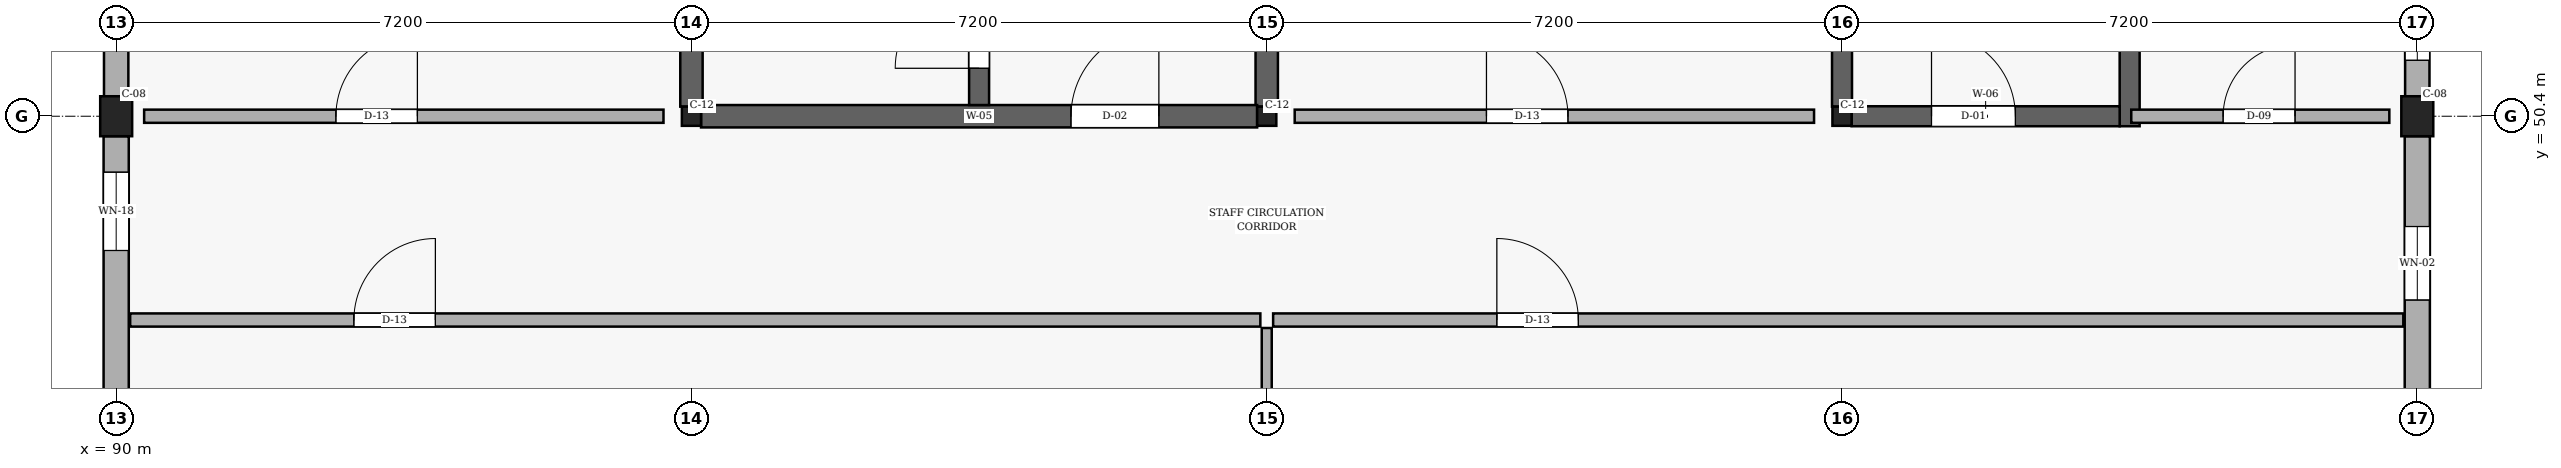
"""IFC4 building model, lengths in metres.
Left out: names, types, materials, properties, quantities, classifications, styles, units other than length and angle.
Written with IfcOpenShell. Run it as: python <this file> out.ifc"""

import sys

from ifc_helpers import new_model, si_unit, direction, frame, frame_2d, origin, origin_2d, place, context, subcontext, project, spatial, rectangle, i_section, extrude, element, fill, save


model = new_model("IFC4")
c1 = context("Model", 3, precision=1e-05, world=origin(), true_north=direction((0.0, 1.0)))
c2 = subcontext(c1, "Body", "Model", "MODEL_VIEW")
j1 = project(units=[si_unit("LENGTHUNIT", "METRE"), si_unit("PLANEANGLEUNIT", "RADIAN")], contexts=[c1])
p1 = place(None, origin())
s1 = spatial("IfcSite", under=j1, at=p1, CompositionType="ELEMENT")
p2 = place(p1, origin())
s2 = spatial("IfcBuilding", under=s1, at=p2, CompositionType="ELEMENT")
p3 = place(p2, frame((0.0, 0.0, 4.5)))
s3 = spatial("IfcBuildingStorey", under=s2, at=p3, CompositionType="ELEMENT", Elevation=4.5)
p4 = place(p3, frame((90.0, 50.4, 0.0), z_axis=(0.0, 0.0, 1.0), x_axis=(1.0, 0.0, 0.0)))
e1 = element("IfcColumn", 1, at=p4, inside=s3, PredefinedType="COLUMN", context=c2, shape_type="SweptSolid", body=[
    extrude(rectangle(XDim=0.4, YDim=0.5, at=origin_2d()), origin(), (0.0, 0.0, 1.0), 3.15),
])
for number, where, z_axis, x_axis in (
    (2, (97.2, 50.4, 0.0), (0.0, 0.0, 1.0), (1.0, 0.0, 0.0)),
    (3, (104.4, 50.4, 0.0), (0.0, 0.0, 1.0), (1.0, 0.0, 0.0)),
    (4, (111.6, 50.4, 0.0), (0.0, 0.0, 1.0), (1.0, 0.0, 0.0)),
):
    element("IfcColumn", number, at=place(p3, frame(where, z_axis=z_axis, x_axis=x_axis)), inside=s3, PredefinedType="COLUMN", context=c2, shape_type="SweptSolid", body=[
        extrude(i_section(OverallWidth=0.24, OverallDepth=0.24, WebThickness=0.01, FlangeThickness=0.017, FilletRadius=0.021, at=origin_2d()), origin(), (0.0, 0.0, 1.0), 3.15),
    ])
p5 = place(p3, frame((118.8, 50.4, 0.0), z_axis=(0.0, 0.0, 1.0), x_axis=(1.0, 0.0, 0.0)))
e5 = element("IfcColumn", 5, at=p5, inside=s3, PredefinedType="COLUMN", context=c2, shape_type="SweptSolid", body=[
    extrude(rectangle(XDim=0.4, YDim=0.5, at=origin_2d()), origin(), (0.0, 0.0, 1.0), 3.15),
])
p6 = place(p3, frame((118.8, 43.45, 0.0), z_axis=(0.0, 0.0, 1.0), x_axis=(0.0, 1.0, 0.0)))
e6 = element("IfcWall", 6, at=p6, inside=s3, PredefinedType="SOLIDWALL", context=c2, shape_type="SweptSolid", body=[
    extrude(rectangle(XDim=6.7, YDim=0.315, at=frame_2d((3.35, 0.0))), origin(), (0.0, 0.0, 1.0), 2.34),
])
p7 = place(p6, frame((0.45, 0.0, 0.78)))
e7 = element("IfcOpeningElement", 7, at=p7, cuts=e6, PredefinedType="OPENING", context=c2, shape_type="SweptSolid", body=[
    extrude(rectangle(XDim=1.45, YDim=1.44, at=frame_2d((0.725, 0.72))), frame((0.0, 0.167, 0.0), z_axis=(0.0, -1.0, 0.0), x_axis=(1.0, 0.0, 0.0)), (0.0, 0.0, 1.0), 0.335),
])
p8 = place(p6, frame((4.65, 0.0, 0.78)))
e8 = element("IfcOpeningElement", 8, at=p8, cuts=e6, PredefinedType="OPENING", context=c2, shape_type="SweptSolid", body=[
    extrude(rectangle(XDim=0.92, YDim=1.15, at=frame_2d((0.46, 0.575))), frame((0.0, 0.167, 0.0), z_axis=(0.0, -1.0, 0.0), x_axis=(1.0, 0.0, 0.0)), (0.0, 0.0, 1.0), 0.335),
])
p9 = place(p3, frame((118.8, 50.65, 0.0), z_axis=(0.0, 0.0, 1.0), x_axis=(0.0, 1.0, 0.0)))
e9 = element("IfcWall", 9, at=p9, inside=s3, PredefinedType="SOLIDWALL", context=c2, shape_type="SweptSolid", body=[
    extrude(rectangle(XDim=6.7, YDim=0.305, at=frame_2d((3.35, 0.0))), origin(), (0.0, 0.0, 1.0), 2.34),
])
p10 = place(p9, frame((0.45, 0.0, 0.78)))
e10 = element("IfcOpeningElement", 10, at=p10, cuts=e9, PredefinedType="OPENING", context=c2, shape_type="SweptSolid", body=[
    extrude(rectangle(XDim=0.92, YDim=1.15, at=frame_2d((0.46, 0.575))), frame((0.0, 0.163, 0.0), z_axis=(0.0, -1.0, 0.0), x_axis=(1.0, 0.0, 0.0)), (0.0, 0.0, 1.0), 0.325),
])
p11 = place(p9, frame((4.65, 0.0, 0.78)))
e11 = element("IfcOpeningElement", 11, at=p11, cuts=e9, PredefinedType="OPENING", context=c2, shape_type="SweptSolid", body=[
    extrude(rectangle(XDim=1.08, YDim=1.15, at=frame_2d((0.54, 0.575))), frame((0.0, 0.163, 0.0), z_axis=(0.0, -1.0, 0.0), x_axis=(1.0, 0.0, 0.0)), (0.0, 0.0, 1.0), 0.325),
])
p12 = place(p3, frame((90.0, 57.35, 0.0), z_axis=(0.0, 0.0, 1.0), x_axis=(0.0, -1.0, 0.0)))
e12 = element("IfcWall", 12, at=p12, inside=s3, PredefinedType="SOLIDWALL", context=c2, shape_type="SweptSolid", body=[
    extrude(rectangle(XDim=6.7, YDim=0.305, at=frame_2d((3.35, 0.0))), origin(), (0.0, 0.0, 1.0), 2.34),
])
p13 = place(p12, frame((0.45, 0.0, 0.78)))
e13 = element("IfcOpeningElement", 13, at=p13, cuts=e12, PredefinedType="OPENING", context=c2, shape_type="SweptSolid", body=[
    extrude(rectangle(XDim=1.44, YDim=1.26, at=frame_2d((0.72, 0.63))), frame((0.0, 0.163, 0.0), z_axis=(0.0, -1.0, 0.0), x_axis=(1.0, 0.0, 0.0)), (0.0, 0.0, 1.0), 0.325),
])
p14 = place(p12, frame((4.65, 0.0, 0.78)))
e14 = element("IfcOpeningElement", 14, at=p14, cuts=e12, PredefinedType="OPENING", context=c2, shape_type="SweptSolid", body=[
    extrude(rectangle(XDim=0.98, YDim=1.36, at=frame_2d((0.49, 0.68))), frame((0.0, 0.163, 0.0), z_axis=(0.0, -1.0, 0.0), x_axis=(1.0, 0.0, 0.0)), (0.0, 0.0, 1.0), 0.325),
])
p15 = place(p3, frame((90.0, 50.15, 0.0), z_axis=(0.0, 0.0, 1.0), x_axis=(0.0, -1.0, 0.0)))
e15 = element("IfcWall", 15, at=p15, inside=s3, PredefinedType="SOLIDWALL", context=c2, shape_type="SweptSolid", body=[
    extrude(rectangle(XDim=6.7, YDim=0.315, at=frame_2d((3.35, 0.0))), origin(), (0.0, 0.0, 1.0), 2.34),
])
p16 = place(p15, frame((0.45, 0.0, 0.78)))
e16 = element("IfcOpeningElement", 16, at=p16, cuts=e15, PredefinedType="OPENING", context=c2, shape_type="SweptSolid", body=[
    extrude(rectangle(XDim=0.98, YDim=1.36, at=frame_2d((0.49, 0.68))), frame((0.0, 0.167, 0.0), z_axis=(0.0, -1.0, 0.0), x_axis=(1.0, 0.0, 0.0)), (0.0, 0.0, 1.0), 0.335),
])
p17 = place(p15, frame((4.65, 0.0, 0.78)))
e17 = element("IfcOpeningElement", 17, at=p17, cuts=e15, PredefinedType="OPENING", context=c2, shape_type="SweptSolid", body=[
    extrude(rectangle(XDim=1.14, YDim=1.36, at=frame_2d((0.57, 0.68))), frame((0.0, 0.167, 0.0), z_axis=(0.0, -1.0, 0.0), x_axis=(1.0, 0.0, 0.0)), (0.0, 0.0, 1.0), 0.335),
])
for number, where, z_axis, x_axis in (
    (18, (97.2, 50.52, 0.0), (0.0, 0.0, 1.0), (0.0, 1.0, 0.0)),
    (19, (104.4, 50.52, 0.0), (0.0, 0.0, 1.0), (0.0, 1.0, 0.0)),
):
    element("IfcWall", number, at=place(p3, frame(where, z_axis=z_axis, x_axis=x_axis)), inside=s3, PredefinedType="SHEAR", context=c2, shape_type="SweptSolid", body=[
        extrude(rectangle(XDim=6.96, YDim=0.28, at=frame_2d((3.48, 0.0))), origin(), (0.0, 0.0, 1.0), 2.89),
    ])
p18 = place(p3, frame((97.32, 50.4, 0.0), z_axis=(0.0, 0.0, 1.0), x_axis=(1.0, 0.0, 0.0)))
e20 = element("IfcWall", 20, at=p18, inside=s3, PredefinedType="SHEAR", context=c2, shape_type="SweptSolid", body=[
    extrude(rectangle(XDim=6.96, YDim=0.28, at=frame_2d((3.48, 0.0))), origin(), (0.0, 0.0, 1.0), 2.89),
])
p19 = place(p18, frame((4.63, 0.0, 0.0)))
e21 = element("IfcOpeningElement", 21, at=p19, cuts=e20, PredefinedType="OPENING", context=c2, shape_type="SweptSolid", body=[
    extrude(rectangle(XDim=1.1, YDim=2.15, at=frame_2d((0.55, 1.075))), frame((0.0, 0.15, 0.0), z_axis=(0.0, -1.0, 0.0), x_axis=(1.0, 0.0, 0.0)), (0.0, 0.0, 1.0), 0.3),
])
p20 = place(p3, frame((100.8, 50.54, 0.0), z_axis=(0.0, 0.0, 1.0), x_axis=(0.0, 1.0, 0.0)))
e22 = element("IfcWall", 22, at=p20, inside=s3, PredefinedType="SHEAR", context=c2, shape_type="SweptSolid", body=[
    extrude(rectangle(XDim=6.92, YDim=0.25, at=frame_2d((3.46, 0.0))), origin(), (0.0, 0.0, 1.0), 2.89),
])
p21 = place(p20, frame((0.46, 0.0, 0.0)))
e23 = element("IfcOpeningElement", 23, at=p21, cuts=e22, PredefinedType="OPENING", context=c2, shape_type="SweptSolid", body=[
    extrude(rectangle(XDim=1.05, YDim=2.15, at=frame_2d((0.525, 1.075))), frame((0.0, 0.135, 0.0), z_axis=(0.0, -1.0, 0.0), x_axis=(1.0, 0.0, 0.0)), (0.0, 0.0, 1.0), 0.27),
])
p22 = place(p3, frame((111.6, 50.52, 0.0), z_axis=(0.0, 0.0, 1.0), x_axis=(0.0, 1.0, 0.0)))
e24 = element("IfcWall", 24, at=p22, inside=s3, PredefinedType="SHEAR", context=c2, shape_type="SweptSolid", body=[
    extrude(rectangle(XDim=6.96, YDim=0.25, at=frame_2d((3.48, 0.0))), origin(), (0.0, 0.0, 1.0), 2.89),
])
p23 = place(p3, frame((115.2, 50.275, 0.0), z_axis=(0.0, 0.0, 1.0), x_axis=(0.0, 1.0, 0.0)))
e25 = element("IfcWall", 25, at=p23, inside=s3, PredefinedType="SHEAR", context=c2, shape_type="SweptSolid", body=[
    extrude(rectangle(XDim=7.45, YDim=0.25, at=frame_2d((3.725, 0.0))), origin(), (0.0, 0.0, 1.0), 2.89),
])
p24 = place(p3, frame((111.72, 50.4, 0.0), z_axis=(0.0, 0.0, 1.0), x_axis=(1.0, 0.0, 0.0)))
e26 = element("IfcWall", 26, at=p24, inside=s3, PredefinedType="SHEAR", context=c2, shape_type="SweptSolid", body=[
    extrude(rectangle(XDim=3.355, YDim=0.25, at=frame_2d((1.677, 0.0))), origin(), (0.0, 0.0, 1.0), 2.89),
])
p25 = place(p24, frame((1.0, 0.0, 0.0)))
e27 = element("IfcOpeningElement", 27, at=p25, cuts=e26, PredefinedType="OPENING", context=c2, shape_type="SweptSolid", body=[
    extrude(rectangle(XDim=1.05, YDim=2.15, at=frame_2d((0.525, 1.075))), frame((0.0, 0.135, 0.0), z_axis=(0.0, -1.0, 0.0), x_axis=(1.0, 0.0, 0.0)), (0.0, 0.0, 1.0), 0.27),
])
p26 = place(p3, frame((90.175, 47.85, 0.0), z_axis=(0.0, 0.0, 1.0), x_axis=(1.0, 0.0, 0.0)))
e28 = element("IfcWall", 28, at=p26, inside=s3, PredefinedType="PARTITIONING", context=c2, shape_type="SweptSolid", body=[
    extrude(rectangle(XDim=14.145, YDim=0.165, at=frame_2d((7.073, 0.0))), origin(), (0.0, 0.0, 1.0), 2.29),
])
p27 = place(p26, frame((2.8, 0.0, 0.0)))
e29 = element("IfcOpeningElement", 29, at=p27, cuts=e28, PredefinedType="OPENING", context=c2, shape_type="SweptSolid", body=[
    extrude(rectangle(XDim=1.02, YDim=2.15, at=frame_2d((0.51, 1.075))), frame((0.0, 0.093, 0.0), z_axis=(0.0, -1.0, 0.0), x_axis=(1.0, 0.0, 0.0)), (0.0, 0.0, 1.0), 0.185),
])
p28 = place(p3, frame((104.48, 47.85, 0.0), z_axis=(0.0, 0.0, 1.0), x_axis=(1.0, 0.0, 0.0)))
e30 = element("IfcWall", 30, at=p28, inside=s3, PredefinedType="PARTITIONING", context=c2, shape_type="SweptSolid", body=[
    extrude(rectangle(XDim=14.145, YDim=0.165, at=frame_2d((7.073, 0.0))), origin(), (0.0, 0.0, 1.0), 2.29),
])
p29 = place(p28, frame((2.8, 0.0, 0.0)))
e31 = element("IfcOpeningElement", 31, at=p29, cuts=e30, PredefinedType="OPENING", context=c2, shape_type="SweptSolid", body=[
    extrude(rectangle(XDim=1.02, YDim=2.15, at=frame_2d((0.51, 1.075))), frame((0.0, 0.093, 0.0), z_axis=(0.0, -1.0, 0.0), x_axis=(1.0, 0.0, 0.0)), (0.0, 0.0, 1.0), 0.185),
])
p30 = place(p3, frame((104.4, 43.55, 0.0), z_axis=(0.0, 0.0, 1.0), x_axis=(0.0, 1.0, 0.0)))
e32 = element("IfcWall", 32, at=p30, inside=s3, PredefinedType="PARTITIONING", context=c2, shape_type="SweptSolid", body=[
    extrude(rectangle(XDim=4.2, YDim=0.125, at=frame_2d((2.1, 0.0))), origin(), (0.0, 0.0, 1.0), 2.29),
])
p31 = place(p3, frame((90.35, 50.4, 0.0), z_axis=(0.0, 0.0, 1.0), x_axis=(1.0, 0.0, 0.0)))
e33 = element("IfcWall", 33, at=p31, inside=s3, PredefinedType="PARTITIONING", context=c2, shape_type="SweptSolid", body=[
    extrude(rectangle(XDim=6.5, YDim=0.165, at=frame_2d((3.25, 0.0))), origin(), (0.0, 0.0, 1.0), 2.29),
])
p32 = place(p31, frame((2.4, 0.0, 0.0)))
e34 = element("IfcOpeningElement", 34, at=p32, cuts=e33, PredefinedType="OPENING", context=c2, shape_type="SweptSolid", body=[
    extrude(rectangle(XDim=1.02, YDim=2.15, at=frame_2d((0.51, 1.075))), frame((0.0, 0.093, 0.0), z_axis=(0.0, -1.0, 0.0), x_axis=(1.0, 0.0, 0.0)), (0.0, 0.0, 1.0), 0.185),
])
p33 = place(p3, frame((104.75, 50.4, 0.0), z_axis=(0.0, 0.0, 1.0), x_axis=(1.0, 0.0, 0.0)))
e35 = element("IfcWall", 35, at=p33, inside=s3, PredefinedType="PARTITIONING", context=c2, shape_type="SweptSolid", body=[
    extrude(rectangle(XDim=6.5, YDim=0.165, at=frame_2d((3.25, 0.0))), origin(), (0.0, 0.0, 1.0), 2.29),
])
p34 = place(p33, frame((2.4, 0.0, 0.0)))
e36 = element("IfcOpeningElement", 36, at=p34, cuts=e35, PredefinedType="OPENING", context=c2, shape_type="SweptSolid", body=[
    extrude(rectangle(XDim=1.02, YDim=2.15, at=frame_2d((0.51, 1.075))), frame((0.0, 0.093, 0.0), z_axis=(0.0, -1.0, 0.0), x_axis=(1.0, 0.0, 0.0)), (0.0, 0.0, 1.0), 0.185),
])
p35 = place(p3, frame((115.22, 50.4, 0.0), z_axis=(0.0, 0.0, 1.0), x_axis=(1.0, 0.0, 0.0)))
e37 = element("IfcWall", 37, at=p35, inside=s3, PredefinedType="PARTITIONING", context=c2, shape_type="SweptSolid", body=[
    extrude(rectangle(XDim=3.23, YDim=0.165, at=frame_2d((1.615, 0.0))), origin(), (0.0, 0.0, 1.0), 2.29),
])
p36 = place(p35, frame((1.15, 0.0, 0.0)))
e38 = element("IfcOpeningElement", 38, at=p36, cuts=e37, PredefinedType="OPENING", context=c2, shape_type="SweptSolid", body=[
    extrude(rectangle(XDim=0.9, YDim=2.05, at=frame_2d((0.45, 1.025))), frame((0.0, 0.093, 0.0), z_axis=(0.0, -1.0, 0.0), x_axis=(1.0, 0.0, 0.0)), (0.0, 0.0, 1.0), 0.185),
])
p37 = place(p8, origin())
e39 = element("IfcWindow", 39, at=p37, inside=s3, PartitioningType="SINGLE_PANEL", PredefinedType="WINDOW", context=c2, shape_type="SweptSolid", body=[
    extrude(rectangle(XDim=0.92, YDim=1.15, at=frame_2d((0.46, 0.575))), frame((0.0, 0.03, 0.0), z_axis=(0.0, -1.0, 0.0), x_axis=(1.0, 0.0, 0.0)), (0.0, 0.0, 1.0), 0.06),
])
fill(e8, e39)
p38 = place(p10, origin())
e40 = element("IfcWindow", 40, at=p38, inside=s3, PartitioningType="SINGLE_PANEL", PredefinedType="WINDOW", context=c2, shape_type="SweptSolid", body=[
    extrude(rectangle(XDim=0.92, YDim=1.15, at=frame_2d((0.46, 0.575))), frame((0.0, 0.03, 0.0), z_axis=(0.0, -1.0, 0.0), x_axis=(1.0, 0.0, 0.0)), (0.0, 0.0, 1.0), 0.06),
])
fill(e10, e40)
p39 = place(p16, origin())
e41 = element("IfcWindow", 41, at=p39, inside=s3, PartitioningType="SINGLE_PANEL", PredefinedType="WINDOW", context=c2, shape_type="SweptSolid", body=[
    extrude(rectangle(XDim=0.98, YDim=1.36, at=frame_2d((0.49, 0.68))), frame((0.0, 0.03, 0.0), z_axis=(0.0, -1.0, 0.0), x_axis=(1.0, 0.0, 0.0)), (0.0, 0.0, 1.0), 0.06),
])
fill(e16, e41)
p40 = place(p19, frame((1.1, 0.0, 0.0), z_axis=(0.0, 0.0, 1.0), x_axis=(-1.0, 0.0, 0.0)))
e42 = element("IfcDoor", 42, at=p40, inside=s3, OperationType="SINGLE_SWING_RIGHT", PredefinedType="DOOR", context=c2, shape_type="SweptSolid", body=[
    extrude(rectangle(XDim=1.1, YDim=2.15, at=frame_2d((0.55, 1.075))), frame((0.0, 0.025, 0.0), z_axis=(0.0, -1.0, 0.0), x_axis=(1.0, 0.0, 0.0)), (0.0, 0.0, 1.0), 0.05),
])
fill(e21, e42)
p41 = place(p21, origin())
e43 = element("IfcDoor", 43, at=p41, inside=s3, OperationType="SINGLE_SWING_LEFT", PredefinedType="DOOR", context=c2, shape_type="SweptSolid", body=[
    extrude(rectangle(XDim=1.05, YDim=2.15, at=frame_2d((0.525, 1.075))), frame((0.0, 0.025, 0.0), z_axis=(0.0, -1.0, 0.0), x_axis=(1.0, 0.0, 0.0)), (0.0, 0.0, 1.0), 0.05),
])
fill(e23, e43)
p42 = place(p25, frame((1.05, 0.0, 0.0), z_axis=(0.0, 0.0, 1.0), x_axis=(-1.0, 0.0, 0.0)))
e44 = element("IfcDoor", 44, at=p42, inside=s3, OperationType="SINGLE_SWING_LEFT", PredefinedType="DOOR", context=c2, shape_type="SweptSolid", body=[
    extrude(rectangle(XDim=1.05, YDim=2.15, at=frame_2d((0.525, 1.075))), frame((0.0, 0.025, 0.0), z_axis=(0.0, -1.0, 0.0), x_axis=(1.0, 0.0, 0.0)), (0.0, 0.0, 1.0), 0.05),
])
fill(e27, e44)
p43 = place(p27, origin())
e45 = element("IfcDoor", 45, at=p43, inside=s3, OperationType="SINGLE_SWING_RIGHT", PredefinedType="DOOR", context=c2, shape_type="SweptSolid", body=[
    extrude(rectangle(XDim=1.02, YDim=2.15, at=frame_2d((0.51, 1.075))), frame((0.0, 0.025, 0.0), z_axis=(0.0, -1.0, 0.0), x_axis=(1.0, 0.0, 0.0)), (0.0, 0.0, 1.0), 0.05),
])
fill(e29, e45)
p44 = place(p29, origin())
e46 = element("IfcDoor", 46, at=p44, inside=s3, OperationType="SINGLE_SWING_LEFT", PredefinedType="DOOR", context=c2, shape_type="SweptSolid", body=[
    extrude(rectangle(XDim=1.02, YDim=2.15, at=frame_2d((0.51, 1.075))), frame((0.0, 0.025, 0.0), z_axis=(0.0, -1.0, 0.0), x_axis=(1.0, 0.0, 0.0)), (0.0, 0.0, 1.0), 0.05),
])
fill(e31, e46)
p45 = place(p32, origin())
e47 = element("IfcDoor", 47, at=p45, inside=s3, OperationType="SINGLE_SWING_RIGHT", PredefinedType="DOOR", context=c2, shape_type="SweptSolid", body=[
    extrude(rectangle(XDim=1.02, YDim=2.15, at=frame_2d((0.51, 1.075))), frame((0.0, 0.025, 0.0), z_axis=(0.0, -1.0, 0.0), x_axis=(1.0, 0.0, 0.0)), (0.0, 0.0, 1.0), 0.05),
])
fill(e34, e47)
p46 = place(p34, origin())
e48 = element("IfcDoor", 48, at=p46, inside=s3, OperationType="SINGLE_SWING_LEFT", PredefinedType="DOOR", context=c2, shape_type="SweptSolid", body=[
    extrude(rectangle(XDim=1.02, YDim=2.15, at=frame_2d((0.51, 1.075))), frame((0.0, 0.025, 0.0), z_axis=(0.0, -1.0, 0.0), x_axis=(1.0, 0.0, 0.0)), (0.0, 0.0, 1.0), 0.05),
])
fill(e36, e48)
p47 = place(p36, origin())
e49 = element("IfcDoor", 49, at=p47, inside=s3, OperationType="SINGLE_SWING_RIGHT", PredefinedType="DOOR", context=c2, shape_type="SweptSolid", body=[
    extrude(rectangle(XDim=0.9, YDim=2.05, at=frame_2d((0.45, 1.025))), frame((0.0, 0.025, 0.0), z_axis=(0.0, -1.0, 0.0), x_axis=(1.0, 0.0, 0.0)), (0.0, 0.0, 1.0), 0.05),
])
fill(e38, e49)
save(model, sys.argv[1])
